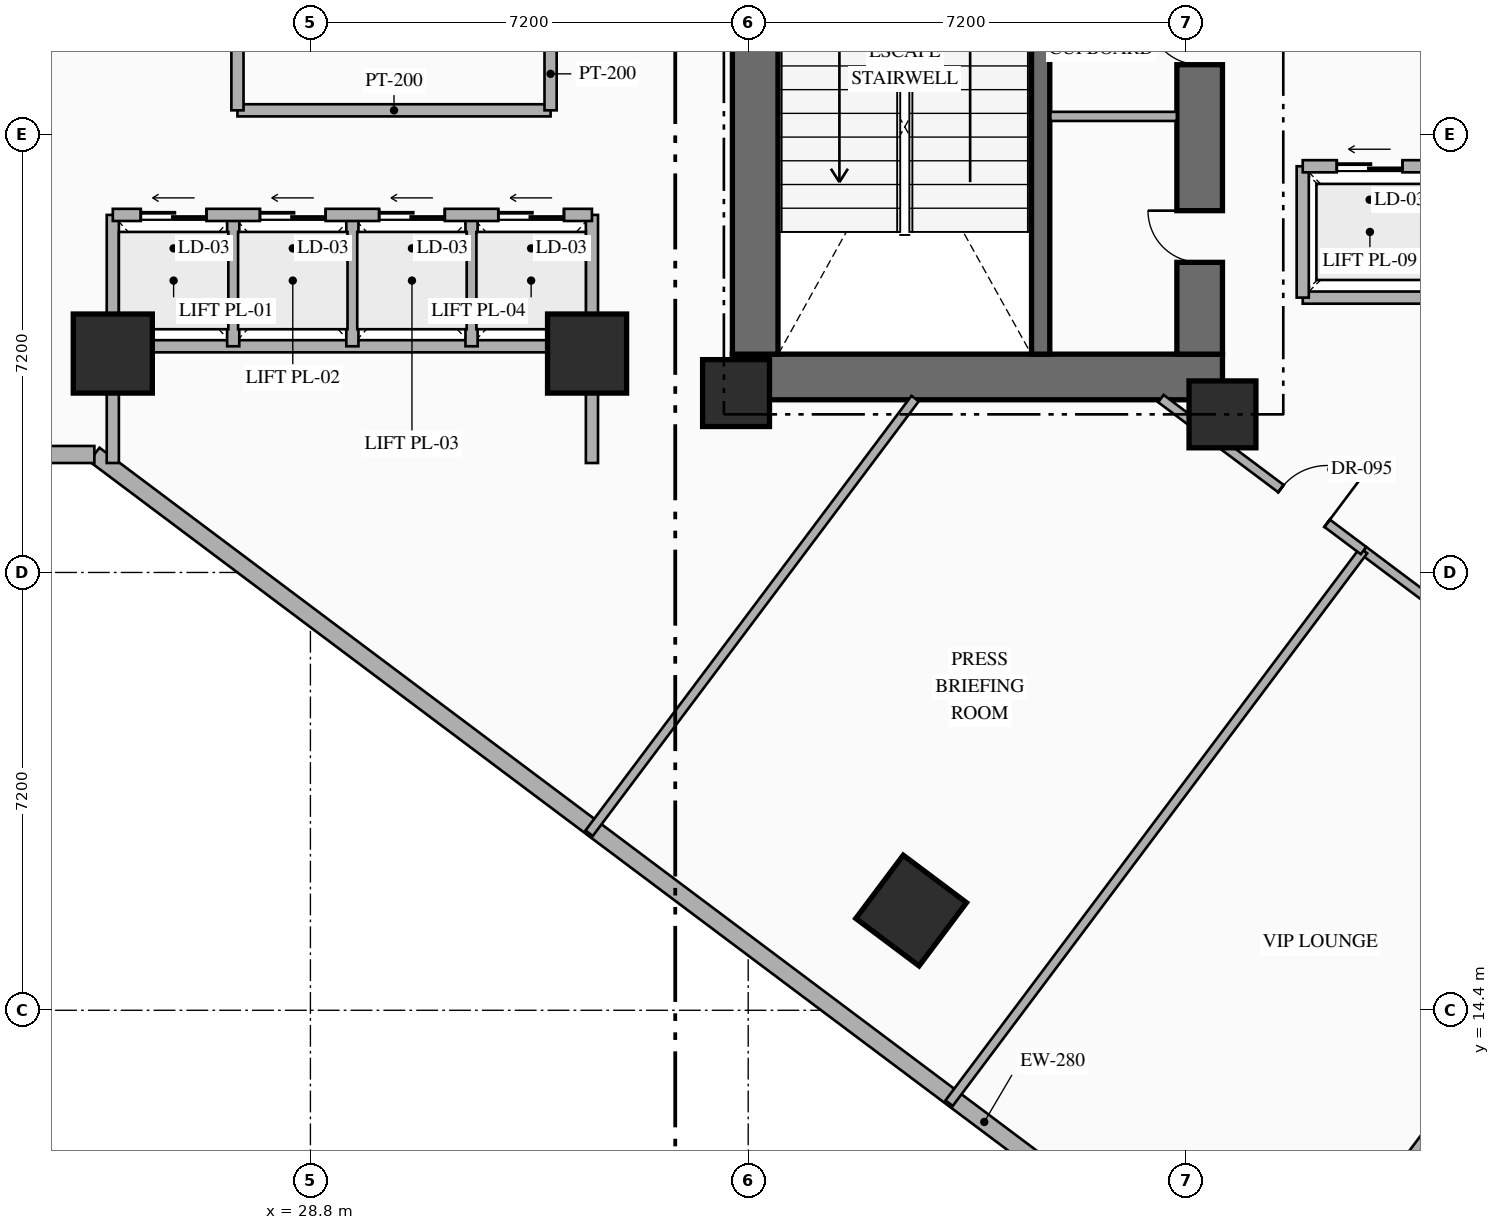
"""IFC4 building model, lengths in metres.
Left out: names, types, materials, properties, quantities, classifications, styles, units other than length and angle.
Written with IfcOpenShell. Run it as: python <this file> out.ifc"""

import sys

from ifc_helpers import new_model, si_unit, direction, frame, frame_2d, origin, origin_2d, place, context, subcontext, project, spatial, rectangle, extrude, element, fill, save


model = new_model("IFC4")
c1 = context("Model", 3, precision=1e-05, world=origin(), true_north=direction((0.0, 1.0)))
c2 = subcontext(c1, "Body", "Model", "MODEL_VIEW")
j1 = project(units=[si_unit("LENGTHUNIT", "METRE"), si_unit("PLANEANGLEUNIT", "RADIAN")], contexts=[c1])
p1 = place(None, origin())
s1 = spatial("IfcSite", under=j1, at=p1, CompositionType="ELEMENT")
p2 = place(p1, origin())
s2 = spatial("IfcBuilding", under=s1, at=p2, CompositionType="ELEMENT")
p3 = place(p2, frame((0.0, 0.0, 16.2)))
s3 = spatial("IfcBuildingStorey", under=s2, at=p3, CompositionType="ELEMENT", Elevation=16.2)
p4 = place(p3, frame((35.74, 24.815, 0.0), z_axis=(0.0, 0.0, 1.0), x_axis=(1.0, 0.0, 0.0)))
e1 = element("IfcWall", 1, at=p4, inside=s3, PredefinedType="SHEAR", context=c2, shape_type="SweptSolid", body=[
    extrude(rectangle(XDim=8.06, YDim=0.75, at=frame_2d((4.03, 0.0))), origin(), (0.0, 0.0, 1.0), 5.4),
])
p5 = place(p3, frame((36.115, 25.19, 0.0), z_axis=(0.0, 0.0, 1.0), x_axis=(0.0, 1.0, 0.0)))
e2 = element("IfcWall", 2, at=p5, inside=s3, PredefinedType="SHEAR", context=c2, shape_type="SweptSolid", body=[
    extrude(rectangle(XDim=9.48, YDim=0.75, at=frame_2d((4.74, 0.0))), origin(), (0.0, 0.0, 1.0), 5.4),
])
p6 = place(p3, frame((43.425, 25.19, 0.0), z_axis=(0.0, 0.0, 1.0), x_axis=(0.0, 1.0, 0.0)))
e3 = element("IfcWall", 3, at=p6, inside=s3, PredefinedType="SHEAR", context=c2, shape_type="SweptSolid", body=[
    extrude(rectangle(XDim=9.48, YDim=0.75, at=frame_2d((4.74, 0.0))), origin(), (0.0, 0.0, 1.0), 5.4),
])
p7 = place(p6, frame((1.51, 0.0, 0.0)))
e4 = element("IfcOpeningElement", 4, at=p7, cuts=e3, PredefinedType="OPENING", context=c2, shape_type="SweptSolid", body=[
    extrude(rectangle(XDim=0.85, YDim=2.08, at=frame_2d((0.425, 1.04))), frame((0.0, 0.385, 0.0), z_axis=(0.0, -1.0, 0.0), x_axis=(1.0, 0.0, 0.0)), (0.0, 0.0, 1.0), 0.77),
])
p8 = place(p6, frame((4.76, 0.0, 0.0)))
e5 = element("IfcOpeningElement", 5, at=p8, cuts=e3, PredefinedType="OPENING", context=c2, shape_type="SweptSolid", body=[
    extrude(rectangle(XDim=0.85, YDim=2.08, at=frame_2d((0.425, 1.04))), frame((0.0, 0.385, 0.0), z_axis=(0.0, -1.0, 0.0), x_axis=(1.0, 0.0, 0.0)), (0.0, 0.0, 1.0), 0.77),
])
p9 = place(p3, frame((40.81, 25.19, 0.0), z_axis=(0.0, 0.0, 1.0), x_axis=(0.0, 1.0, 0.0)))
e6 = element("IfcWall", 6, at=p9, inside=s3, PredefinedType="SHEAR", context=c2, shape_type="SweptSolid", body=[
    extrude(rectangle(XDim=9.48, YDim=0.3, at=frame_2d((4.74, 0.0))), origin(), (0.0, 0.0, 1.0), 5.4),
])
for number, where, z_axis, x_axis in (
    (7, (35.8, 24.55, 0.0), (0.0, 0.0, 1.0), (1.0, 0.0, 0.0)),
    (8, (43.8, 24.2, 0.0), (0.0, 0.0, 1.0), (1.0, 0.0, 0.0)),
):
    element("IfcColumn", number, at=place(p3, frame(where, z_axis=z_axis, x_axis=x_axis)), inside=s3, PredefinedType="COLUMN", context=c2, shape_type="SweptSolid", body=[
        extrude(rectangle(XDim=1.1, YDim=1.1, at=origin_2d()), origin(), (0.0, 0.0, 1.0), 5.4),
    ])
for number, where, z_axis, x_axis in (
    (9, (25.55, 25.2, 0.0), (0.0, 0.0, 1.0), (1.0, 0.0, 0.0)),
    (10, (33.35, 25.2, 0.0), (0.0, 0.0, 1.0), (1.0, 0.0, 0.0)),
    (11, (38.68, 16.04, 0.0), (0.0, 0.0, 1.0), (0.8, -0.6, 0.0)),
):
    element("IfcColumn", number, at=place(p3, frame(where, z_axis=z_axis, x_axis=x_axis)), inside=s3, PredefinedType="COLUMN", context=c2, shape_type="SweptSolid", body=[
        extrude(rectangle(XDim=1.3, YDim=1.3, at=origin_2d()), origin(), (0.0, 0.0, 1.0), 5.4),
    ])
p10 = place(p3, frame((54.518, 1.587, 0.0), z_axis=(0.0, 0.0, 1.0), x_axis=(-0.800001601415, 0.599997864774, 0.0)))
e12 = element("IfcWall", 12, at=p10, inside=s3, PredefinedType="STANDARD", context=c2, shape_type="SweptSolid", body=[
    extrude(rectangle(XDim=36.589, YDim=0.28, at=frame_2d((18.294, 0.0))), origin(), (0.0, 0.0, 1.0), 5.1),
])
p11 = place(p3, frame((25.247, 23.54, 0.0), z_axis=(0.0, 0.0, 1.0), x_axis=(-1.0, 0.0, 0.0)))
e13 = element("IfcWall", 13, at=p11, inside=s3, PredefinedType="STANDARD", context=c2, shape_type="SweptSolid", body=[
    extrude(rectangle(XDim=6.747, YDim=0.28, at=frame_2d((3.374, 0.0))), origin(), (0.0, 0.0, 1.0), 5.1),
])
p12 = place(p3, frame((40.97, 29.1, 0.0), z_axis=(0.0, 0.0, 1.0), x_axis=(1.0, 0.0, 0.0)))
e14 = element("IfcWall", 14, at=p12, inside=s3, PredefinedType="PARTITIONING", context=c2, shape_type="SweptSolid", body=[
    extrude(rectangle(XDim=2.08, YDim=0.15, at=frame_2d((1.04, 0.0))), origin(), (0.0, 0.0, 1.0), 5.1),
])
p13 = place(p3, frame((27.6, 29.2, 0.0), z_axis=(0.0, 0.0, 1.0), x_axis=(1.0, 0.0, 0.0)))
e15 = element("IfcWall", 15, at=p13, inside=s3, PredefinedType="STANDARD", context=c2, shape_type="SweptSolid", body=[
    extrude(rectangle(XDim=5.15, YDim=0.2, at=frame_2d((2.575, 0.0))), origin(), (0.0, 0.0, 1.0), 5.1),
])
p14 = place(p3, frame((27.6, 29.2, 0.0), z_axis=(0.0, 0.0, 1.0), x_axis=(0.0, 1.0, 0.0)))
e16 = element("IfcWall", 16, at=p14, inside=s3, PredefinedType="STANDARD", context=c2, shape_type="SweptSolid", body=[
    extrude(rectangle(XDim=3.24, YDim=0.2, at=frame_2d((1.62, 0.0))), origin(), (0.0, 0.0, 1.0), 5.1),
])
p15 = place(p3, frame((32.75, 29.2, 0.0), z_axis=(0.0, 0.0, 1.0), x_axis=(0.0, 1.0, 0.0)))
e17 = element("IfcWall", 17, at=p15, inside=s3, PredefinedType="STANDARD", context=c2, shape_type="SweptSolid", body=[
    extrude(rectangle(XDim=3.24, YDim=0.2, at=frame_2d((1.62, 0.0))), origin(), (0.0, 0.0, 1.0), 5.1),
])
p16 = place(p15, frame((1.45, 0.0, 0.0)))
e18 = element("IfcOpeningElement", 18, at=p16, cuts=e17, PredefinedType="OPENING", context=c2, shape_type="SweptSolid", body=[
    extrude(rectangle(XDim=1.0, YDim=2.2, at=frame_2d((0.5, 1.1))), frame((0.0, 0.11, 0.0), z_axis=(0.0, -1.0, 0.0), x_axis=(1.0, 0.0, 0.0)), (0.0, 0.0, 1.0), 0.22),
])
for number, where, z_axis, x_axis in (
    (19, (25.55, 23.4, 0.0), (0.0, 0.0, 1.0), (0.0, 1.0, 0.0)),
    (20, (33.43, 23.4, 0.0), (0.0, 0.0, 1.0), (0.0, 1.0, 0.0)),
):
    element("IfcWall", number, at=place(p3, frame(where, z_axis=z_axis, x_axis=x_axis)), inside=s3, PredefinedType="STANDARD", context=c2, shape_type="SweptSolid", body=[
        extrude(rectangle(XDim=4.08, YDim=0.2, at=frame_2d((2.04, 0.0))), origin(), (0.0, 0.0, 1.0), 3.895),
    ])
p17 = place(p3, frame((25.55, 25.32, 0.0), z_axis=(0.0, 0.0, 1.0), x_axis=(1.0, 0.0, 0.0)))
e21 = element("IfcWall", 21, at=p17, inside=s3, PredefinedType="STANDARD", context=c2, shape_type="SweptSolid", body=[
    extrude(rectangle(XDim=7.88, YDim=0.2, at=frame_2d((3.94, 0.0))), origin(), (0.0, 0.0, 1.0), 4.495),
])
for number, where, z_axis, x_axis in (
    (22, (27.53, 25.32, 0.0), (0.0, 0.0, 1.0), (0.0, 1.0, 0.0)),
    (23, (29.49, 25.32, 0.0), (0.0, 0.0, 1.0), (0.0, 1.0, 0.0)),
    (24, (31.45, 25.32, 0.0), (0.0, 0.0, 1.0), (0.0, 1.0, 0.0)),
):
    element("IfcWall", number, at=place(p3, frame(where, z_axis=z_axis, x_axis=x_axis)), inside=s3, PredefinedType="STANDARD", context=c2, shape_type="SweptSolid", body=[
        extrude(rectangle(XDim=2.16, YDim=0.2, at=frame_2d((1.08, 0.0))), origin(), (0.0, 0.0, 1.0), 5.1),
    ])
p18 = place(p3, frame((25.55, 27.48, 0.0), z_axis=(0.0, 0.0, 1.0), x_axis=(1.0, 0.0, 0.0)))
e25 = element("IfcWall", 25, at=p18, inside=s3, PredefinedType="STANDARD", context=c2, shape_type="SweptSolid", body=[
    extrude(rectangle(XDim=7.88, YDim=0.2, at=frame_2d((3.94, 0.0))), origin(), (0.0, 0.0, 1.0), 5.1),
])
p19 = place(p18, frame((0.46, 0.0, 0.0)))
e26 = element("IfcOpeningElement", 26, at=p19, cuts=e25, PredefinedType="OPENING", context=c2, shape_type="SweptSolid", body=[
    extrude(rectangle(XDim=1.08, YDim=2.15, at=frame_2d((0.54, 1.075))), frame((0.0, 0.11, 0.0), z_axis=(0.0, -1.0, 0.0), x_axis=(1.0, 0.0, 0.0)), (0.0, 0.0, 1.0), 0.22),
])
p20 = place(p18, frame((2.42, 0.0, 0.0)))
e27 = element("IfcOpeningElement", 27, at=p20, cuts=e25, PredefinedType="OPENING", context=c2, shape_type="SweptSolid", body=[
    extrude(rectangle(XDim=1.08, YDim=2.15, at=frame_2d((0.54, 1.075))), frame((0.0, 0.11, 0.0), z_axis=(0.0, -1.0, 0.0), x_axis=(1.0, 0.0, 0.0)), (0.0, 0.0, 1.0), 0.22),
])
p21 = place(p18, frame((4.38, 0.0, 0.0)))
e28 = element("IfcOpeningElement", 28, at=p21, cuts=e25, PredefinedType="OPENING", context=c2, shape_type="SweptSolid", body=[
    extrude(rectangle(XDim=1.08, YDim=2.15, at=frame_2d((0.54, 1.075))), frame((0.0, 0.11, 0.0), z_axis=(0.0, -1.0, 0.0), x_axis=(1.0, 0.0, 0.0)), (0.0, 0.0, 1.0), 0.22),
])
p22 = place(p18, frame((6.34, 0.0, 0.0)))
e29 = element("IfcOpeningElement", 29, at=p22, cuts=e25, PredefinedType="OPENING", context=c2, shape_type="SweptSolid", body=[
    extrude(rectangle(XDim=1.08, YDim=2.15, at=frame_2d((0.54, 1.075))), frame((0.0, 0.11, 0.0), z_axis=(0.0, -1.0, 0.0), x_axis=(1.0, 0.0, 0.0)), (0.0, 0.0, 1.0), 0.22),
])
p23 = place(p3, frame((45.12, 26.12, 0.0), z_axis=(0.0, 0.0, 1.0), x_axis=(1.0, 0.0, 0.0)))
e30 = element("IfcWall", 30, at=p23, inside=s3, PredefinedType="STANDARD", context=c2, shape_type="SweptSolid", body=[
    extrude(rectangle(XDim=4.4, YDim=0.2, at=frame_2d((2.2, 0.0))), origin(), (0.0, 0.0, 1.0), 5.1),
])
p24 = place(p3, frame((45.12, 26.12, 0.0), z_axis=(0.0, 0.0, 1.0), x_axis=(0.0, 1.0, 0.0)))
e31 = element("IfcWall", 31, at=p24, inside=s3, PredefinedType="STANDARD", context=c2, shape_type="SweptSolid", body=[
    extrude(rectangle(XDim=2.16, YDim=0.2, at=frame_2d((1.08, 0.0))), origin(), (0.0, 0.0, 1.0), 5.1),
])
p25 = place(p3, frame((45.12, 28.28, 0.0), z_axis=(0.0, 0.0, 1.0), x_axis=(1.0, 0.0, 0.0)))
e32 = element("IfcWall", 32, at=p25, inside=s3, PredefinedType="STANDARD", context=c2, shape_type="SweptSolid", body=[
    extrude(rectangle(XDim=4.4, YDim=0.2, at=frame_2d((2.2, 0.0))), origin(), (0.0, 0.0, 1.0), 5.1),
])
p26 = place(p25, frame((0.56, 0.0, 0.0)))
e33 = element("IfcOpeningElement", 33, at=p26, cuts=e32, PredefinedType="OPENING", context=c2, shape_type="SweptSolid", body=[
    extrude(rectangle(XDim=1.08, YDim=2.15, at=frame_2d((0.54, 1.075))), frame((0.0, 0.11, 0.0), z_axis=(0.0, -1.0, 0.0), x_axis=(1.0, 0.0, 0.0)), (0.0, 0.0, 1.0), 0.22),
])
p27 = place(p25, frame((2.76, 0.0, 0.0)))
e34 = element("IfcOpeningElement", 34, at=p27, cuts=e32, PredefinedType="OPENING", context=c2, shape_type="SweptSolid", body=[
    extrude(rectangle(XDim=1.08, YDim=2.15, at=frame_2d((0.54, 1.075))), frame((0.0, 0.11, 0.0), z_axis=(0.0, -1.0, 0.0), x_axis=(1.0, 0.0, 0.0)), (0.0, 0.0, 1.0), 0.22),
])
p28 = place(p3, frame((46.12, 21.96, 0.0), z_axis=(0.0, 0.0, 1.0), x_axis=(0.799991121809, -0.600011837406, 0.0)))
e35 = element("IfcWall", 35, at=p28, inside=s3, PredefinedType="PARTITIONING", context=c2, shape_type="SweptSolid", body=[
    extrude(rectangle(XDim=6.6, YDim=0.15, at=frame_2d((3.3, 0.0))), origin(), (0.0, 0.0, 1.0), 5.1),
])
p29 = place(p28, frame((2.8, 0.0, 0.0)))
e36 = element("IfcOpeningElement", 36, at=p29, cuts=e35, PredefinedType="OPENING", context=c2, shape_type="SweptSolid", body=[
    extrude(rectangle(XDim=1.0, YDim=2.15, at=frame_2d((0.5, 1.075))), frame((0.0, 0.085, 0.0), z_axis=(0.0, -1.0, 0.0), x_axis=(1.0, 0.0, 0.0)), (0.0, 0.0, 1.0), 0.17),
])
p30 = place(p3, frame((39.304, 12.872, 0.0), z_axis=(0.0, 0.0, 1.0), x_axis=(0.600013754301, 0.79998968409, 0.0)))
e37 = element("IfcWall", 37, at=p30, inside=s3, PredefinedType="PARTITIONING", context=c2, shape_type="SweptSolid", body=[
    extrude(rectangle(XDim=11.36, YDim=0.15, at=frame_2d((5.68, 0.0))), origin(), (0.0, 0.0, 1.0), 5.1),
])
p31 = place(p3, frame((44.584, 8.912, 0.0), z_axis=(0.0, 0.0, 1.0), x_axis=(0.6, 0.8, 0.0)))
e38 = element("IfcWall", 38, at=p31, inside=s3, PredefinedType="PARTITIONING", context=c2, shape_type="SweptSolid", body=[
    extrude(rectangle(XDim=11.36, YDim=0.15, at=frame_2d((5.68, 0.0))), origin(), (0.0, 0.0, 1.0), 5.1),
])
p32 = place(p3, frame((46.72, 31.76, 0.0), z_axis=(0.0, 0.0, 1.0), x_axis=(0.79999511724, -0.600006510291, 0.0)))
e39 = element("IfcWall", 39, at=p32, inside=s3, PredefinedType="PARTITIONING", context=c2, shape_type="SweptSolid", body=[
    extrude(rectangle(XDim=6.0, YDim=0.15, at=frame_2d((3.0, 0.0))), origin(), (0.0, 0.0, 1.0), 5.1),
])
p33 = place(p32, frame((2.243, 0.0, 0.0)))
e40 = element("IfcOpeningElement", 40, at=p33, cuts=e39, PredefinedType="OPENING", context=c2, shape_type="SweptSolid", body=[
    extrude(rectangle(XDim=1.1, YDim=2.16, at=frame_2d((0.55, 1.08))), frame((0.0, 0.085, 0.0), z_axis=(0.0, -1.0, 0.0), x_axis=(1.0, 0.0, 0.0)), (0.0, 0.0, 1.0), 0.17),
])
p34 = place(p3, frame((42.787, 24.46, 0.0), z_axis=(0.0, 0.0, 1.0), x_axis=(0.799971872363, -0.600037501685, 0.0)))
e41 = element("IfcWall", 41, at=p34, inside=s3, PredefinedType="PARTITIONING", context=c2, shape_type="SweptSolid", body=[
    extrude(rectangle(XDim=4.167, YDim=0.15, at=frame_2d((2.083, 0.0))), origin(), (0.0, 0.0, 1.0), 5.1),
])
p35 = place(p34, frame((2.468, 0.0, 0.0)))
e42 = element("IfcOpeningElement", 42, at=p35, cuts=e41, PredefinedType="OPENING", context=c2, shape_type="SweptSolid", body=[
    extrude(rectangle(XDim=0.95, YDim=2.15, at=frame_2d((0.475, 1.075))), frame((0.0, 0.085, 0.0), z_axis=(0.0, -1.0, 0.0), x_axis=(1.0, 0.0, 0.0)), (0.0, 0.0, 1.0), 0.17),
])
p36 = place(p3, frame((33.384, 17.312, 0.0), z_axis=(0.0, 0.0, 1.0), x_axis=(0.600008743659, 0.799993442181, 0.0)))
e43 = element("IfcWall", 43, at=p36, inside=s3, PredefinedType="PARTITIONING", context=c2, shape_type="SweptSolid", body=[
    extrude(rectangle(XDim=8.935, YDim=0.15, at=frame_2d((4.468, 0.0))), origin(), (0.0, 0.0, 1.0), 5.1),
])
p37 = place(p7, origin())
e44 = element("IfcDoor", 44, at=p37, inside=s3, OperationType="SINGLE_SWING_RIGHT", PredefinedType="DOOR", context=c2, shape_type="SweptSolid", body=[
    extrude(rectangle(XDim=0.85, YDim=2.08, at=frame_2d((0.425, 1.04))), frame((0.0, 0.025, 0.0), z_axis=(0.0, -1.0, 0.0), x_axis=(1.0, 0.0, 0.0)), (0.0, 0.0, 1.0), 0.05),
])
fill(e4, e44)
p38 = place(p8, origin())
e45 = element("IfcDoor", 45, at=p38, inside=s3, OperationType="SINGLE_SWING_RIGHT", PredefinedType="DOOR", context=c2, shape_type="SweptSolid", body=[
    extrude(rectangle(XDim=0.85, YDim=2.08, at=frame_2d((0.425, 1.04))), frame((0.0, 0.025, 0.0), z_axis=(0.0, -1.0, 0.0), x_axis=(1.0, 0.0, 0.0)), (0.0, 0.0, 1.0), 0.05),
])
fill(e5, e45)
p39 = place(p19, origin())
e46 = element("IfcDoor", 46, at=p39, inside=s3, OperationType="SLIDING_TO_LEFT", PredefinedType="USERDEFINED", context=c2, shape_type="SweptSolid", body=[
    extrude(rectangle(XDim=1.08, YDim=2.15, at=frame_2d((0.54, 1.075))), frame((0.0, 0.025, 0.0), z_axis=(0.0, -1.0, 0.0), x_axis=(1.0, 0.0, 0.0)), (0.0, 0.0, 1.0), 0.05),
])
fill(e26, e46)
p40 = place(p20, origin())
e47 = element("IfcDoor", 47, at=p40, inside=s3, OperationType="SLIDING_TO_LEFT", PredefinedType="USERDEFINED", context=c2, shape_type="SweptSolid", body=[
    extrude(rectangle(XDim=1.08, YDim=2.15, at=frame_2d((0.54, 1.075))), frame((0.0, 0.025, 0.0), z_axis=(0.0, -1.0, 0.0), x_axis=(1.0, 0.0, 0.0)), (0.0, 0.0, 1.0), 0.05),
])
fill(e27, e47)
p41 = place(p21, origin())
e48 = element("IfcDoor", 48, at=p41, inside=s3, OperationType="SLIDING_TO_LEFT", PredefinedType="USERDEFINED", context=c2, shape_type="SweptSolid", body=[
    extrude(rectangle(XDim=1.08, YDim=2.15, at=frame_2d((0.54, 1.075))), frame((0.0, 0.025, 0.0), z_axis=(0.0, -1.0, 0.0), x_axis=(1.0, 0.0, 0.0)), (0.0, 0.0, 1.0), 0.05),
])
fill(e28, e48)
p42 = place(p22, origin())
e49 = element("IfcDoor", 49, at=p42, inside=s3, OperationType="SLIDING_TO_LEFT", PredefinedType="USERDEFINED", context=c2, shape_type="SweptSolid", body=[
    extrude(rectangle(XDim=1.08, YDim=2.15, at=frame_2d((0.54, 1.075))), frame((0.0, 0.025, 0.0), z_axis=(0.0, -1.0, 0.0), x_axis=(1.0, 0.0, 0.0)), (0.0, 0.0, 1.0), 0.05),
])
fill(e29, e49)
p43 = place(p26, origin())
e50 = element("IfcDoor", 50, at=p43, inside=s3, OperationType="SLIDING_TO_LEFT", PredefinedType="USERDEFINED", context=c2, shape_type="SweptSolid", body=[
    extrude(rectangle(XDim=1.08, YDim=2.15, at=frame_2d((0.54, 1.075))), frame((0.0, 0.025, 0.0), z_axis=(0.0, -1.0, 0.0), x_axis=(1.0, 0.0, 0.0)), (0.0, 0.0, 1.0), 0.05),
])
fill(e33, e50)
p44 = place(p35, origin())
e51 = element("IfcDoor", 51, at=p44, inside=s3, OperationType="SINGLE_SWING_RIGHT", PredefinedType="DOOR", context=c2, shape_type="SweptSolid", body=[
    extrude(rectangle(XDim=0.95, YDim=2.15, at=frame_2d((0.475, 1.075))), frame((0.0, 0.025, 0.0), z_axis=(0.0, -1.0, 0.0), x_axis=(1.0, 0.0, 0.0)), (0.0, 0.0, 1.0), 0.05),
])
fill(e42, e51)
save(model, sys.argv[1])
